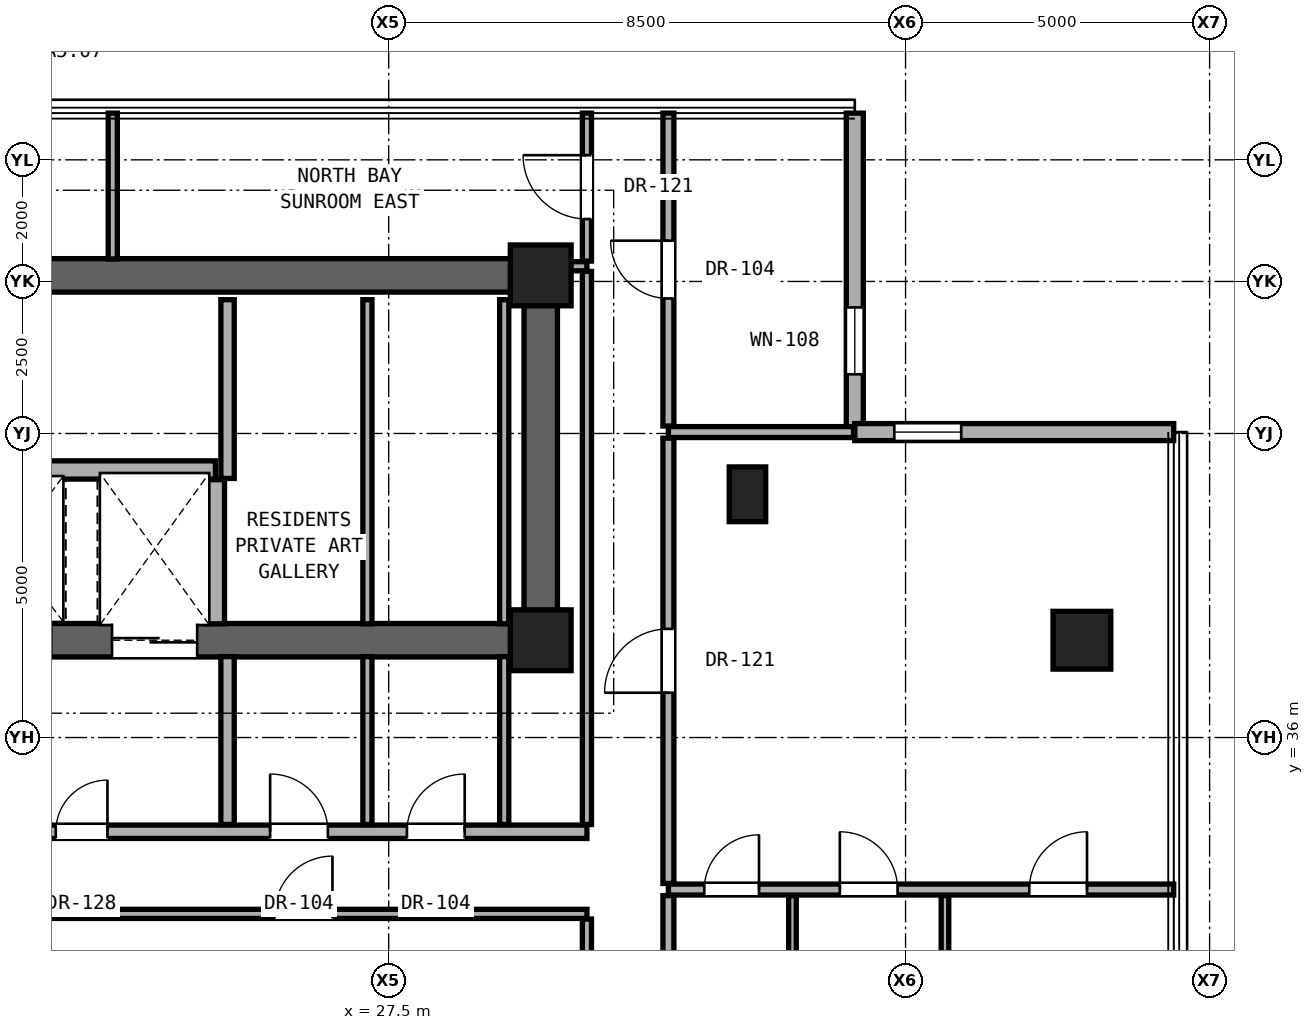
"""IFC4 building model, lengths in metres.
Left out: names, types, materials, properties, quantities, classifications, styles, units other than length and angle.
Written with IfcOpenShell. Run it as: python <this file> out.ifc"""

import sys

from ifc_helpers import new_model, si_unit, direction, frame, frame_2d, origin, origin_2d, place, context, subcontext, project, spatial, rectangle, hollow_rectangle, extrude, element, fill, save


model = new_model("IFC4")
c1 = context("Model", 3, precision=1e-05, world=origin(), true_north=direction((0.0, 1.0)))
c2 = subcontext(c1, "Body", "Model", "MODEL_VIEW")
j1 = project(units=[si_unit("LENGTHUNIT", "METRE"), si_unit("PLANEANGLEUNIT", "RADIAN")], contexts=[c1])
p1 = place(None, origin())
s1 = spatial("IfcSite", under=j1, at=p1, CompositionType="ELEMENT")
p2 = place(p1, origin())
s2 = spatial("IfcBuilding", under=s1, at=p2, CompositionType="ELEMENT")
p3 = place(p2, frame((0.0, 0.0, 157.65)))
s3 = spatial("IfcBuildingStorey", under=s2, at=p3, CompositionType="ELEMENT", Elevation=157.65)
for number, where, z_axis, x_axis in (
    (1, (30.0, 37.6, 0.0), (0.0, 0.0, 1.0), (1.0, 0.0, 0.0)),
    (2, (30.0, 43.6, 0.0), (0.0, 0.0, 1.0), (1.0, 0.0, 0.0)),
):
    element("IfcColumn", number, at=place(p3, frame(where, z_axis=z_axis, x_axis=x_axis)), inside=s3, PredefinedType="COLUMN", context=c2, shape_type="SweptSolid", body=[
        extrude(rectangle(XDim=1.0, YDim=1.0, at=origin_2d()), origin(), (0.0, 0.0, 1.0), 3.25),
    ])
p4 = place(p3, frame((38.9, 37.6, 0.0), z_axis=(0.0, 0.0, 1.0), x_axis=(1.0, 0.0, 0.0)))
e3 = element("IfcColumn", 3, at=p4, inside=s3, PredefinedType="COLUMN", context=c2, shape_type="SweptSolid", body=[
    extrude(hollow_rectangle(XDim=0.95, YDim=0.95, WallThickness=0.05, at=origin_2d()), origin(), (0.0, 0.0, 1.0), 3.25),
])
p5 = place(p3, frame((33.4, 40.0, 0.0), z_axis=(0.0, 0.0, 1.0), x_axis=(1.0, 0.0, 0.0)))
e4 = element("IfcColumn", 4, at=p5, inside=s3, PredefinedType="PILASTER", context=c2, shape_type="SweptSolid", body=[
    extrude(rectangle(XDim=0.6, YDim=0.9, at=origin_2d()), origin(), (0.0, 0.0, 1.0), 3.25),
])
p6 = place(p3, frame((11.0, 43.6, 0.0), z_axis=(0.0, 0.0, 1.0), x_axis=(1.0, 0.0, 0.0)))
e5 = element("IfcWall", 5, at=p6, inside=s3, PredefinedType="SHEAR", context=c2, shape_type="SweptSolid", body=[
    extrude(rectangle(XDim=19.0, YDim=0.55, at=frame_2d((9.5, 0.0))), origin(), (0.0, 0.0, 1.0), 3.05),
])
p7 = place(p3, frame((30.0, 37.6, 0.0), z_axis=(0.0, 0.0, 1.0), x_axis=(0.0, 1.0, 0.0)))
e6 = element("IfcWall", 6, at=p7, inside=s3, PredefinedType="SHEAR", context=c2, shape_type="SweptSolid", body=[
    extrude(rectangle(XDim=6.0, YDim=0.55, at=frame_2d((3.0, 0.0))), origin(), (0.0, 0.0, 1.0), 3.05),
])
p8 = place(p3, frame((11.0, 37.6, 0.0), z_axis=(0.0, 0.0, 1.0), x_axis=(1.0, 0.0, 0.0)))
e7 = element("IfcWall", 7, at=p8, inside=s3, PredefinedType="SHEAR", context=c2, shape_type="SweptSolid", body=[
    extrude(rectangle(XDim=19.0, YDim=0.55, at=frame_2d((9.5, 0.0))), origin(), (0.0, 0.0, 1.0), 3.05),
])
p9 = place(p8, frame((1.06, 0.0, 0.0)))
e8 = element("IfcOpeningElement", 8, at=p9, cuts=e7, PredefinedType="OPENING", context=c2, shape_type="SweptSolid", body=[
    extrude(rectangle(XDim=1.15, YDim=2.2, at=frame_2d((0.575, 1.1))), frame((0.0, 0.285, 0.0), z_axis=(0.0, -1.0, 0.0), x_axis=(1.0, 0.0, 0.0)), (0.0, 0.0, 1.0), 0.57),
])
p10 = place(p8, frame((9.55, 0.0, 0.0)))
e9 = element("IfcOpeningElement", 9, at=p10, cuts=e7, PredefinedType="OPENING", context=c2, shape_type="SweptSolid", body=[
    extrude(rectangle(XDim=1.4, YDim=2.35, at=frame_2d((0.7, 1.175))), frame((0.0, 0.285, 0.0), z_axis=(0.0, -1.0, 0.0), x_axis=(1.0, 0.0, 0.0)), (0.0, 0.0, 1.0), 0.57),
])
p11 = place(p8, frame((11.95, 0.0, 0.0)))
e10 = element("IfcOpeningElement", 10, at=p11, cuts=e7, PredefinedType="OPENING", context=c2, shape_type="SweptSolid", body=[
    extrude(rectangle(XDim=1.4, YDim=2.35, at=frame_2d((0.7, 1.175))), frame((0.0, 0.285, 0.0), z_axis=(0.0, -1.0, 0.0), x_axis=(1.0, 0.0, 0.0)), (0.0, 0.0, 1.0), 0.57),
])
p12 = place(p3, frame((35.165, 41.023, 0.0), z_axis=(0.0, 0.0, 1.0), x_axis=(0.0, 1.0, 0.0)))
e11 = element("IfcWall", 11, at=p12, inside=s3, PredefinedType="SOLIDWALL", context=c2, shape_type="SweptSolid", body=[
    extrude(rectangle(XDim=5.245, YDim=0.28, at=frame_2d((2.623, 0.0))), origin(), (0.0, 0.0, 1.0), 3.03),
])
p13 = place(p12, frame((0.95, 0.0, 0.85)))
e12 = element("IfcOpeningElement", 12, at=p13, cuts=e11, PredefinedType="OPENING", context=c2, shape_type="SweptSolid", body=[
    extrude(rectangle(XDim=1.1, YDim=2.0, at=frame_2d((0.55, 1.0))), frame((0.0, 0.15, 0.0), z_axis=(0.0, -1.0, 0.0), x_axis=(1.0, 0.0, 0.0)), (0.0, 0.0, 1.0), 0.3),
])
p14 = place(p3, frame((40.41, 41.023, 0.0), z_axis=(0.0, 0.0, 1.0), x_axis=(-1.0, 0.0, 0.0)))
e13 = element("IfcWall", 13, at=p14, inside=s3, PredefinedType="SOLIDWALL", context=c2, shape_type="SweptSolid", body=[
    extrude(rectangle(XDim=5.245, YDim=0.28, at=frame_2d((2.623, 0.0))), origin(), (0.0, 0.0, 1.0), 3.03),
])
p15 = place(p14, frame((3.495, 0.0, 0.85)))
e14 = element("IfcOpeningElement", 14, at=p15, cuts=e13, PredefinedType="OPENING", context=c2, shape_type="SweptSolid", body=[
    extrude(rectangle(XDim=1.1, YDim=2.0, at=frame_2d((0.55, 1.0))), frame((0.0, 0.15, 0.0), z_axis=(0.0, -1.0, 0.0), x_axis=(1.0, 0.0, 0.0)), (0.0, 0.0, 1.0), 0.3),
])
p16 = place(p3, frame((21.44, 33.1, 0.0), z_axis=(0.0, 0.0, 1.0), x_axis=(1.0, 0.0, 0.0)))
e15 = element("IfcWall", 15, at=p16, inside=s3, PredefinedType="PARTITIONING", context=c2, shape_type="SweptSolid", body=[
    extrude(rectangle(XDim=9.32, YDim=0.15, at=frame_2d((4.66, 0.0))), origin(), (0.0, 0.0, 1.0), 2.186),
])
p17 = place(p16, frame((4.185, 0.0, 0.0)))
e16 = element("IfcOpeningElement", 16, at=p17, cuts=e15, PredefinedType="OPENING", context=c2, shape_type="SweptSolid", body=[
    extrude(rectangle(XDim=0.95, YDim=2.15, at=frame_2d((0.475, 1.075))), frame((0.0, 0.085, 0.0), z_axis=(0.0, -1.0, 0.0), x_axis=(1.0, 0.0, 0.0)), (0.0, 0.0, 1.0), 0.17),
])
p18 = place(p3, frame((32.1, 33.5, 0.0), z_axis=(0.0, 0.0, 1.0), x_axis=(1.0, 0.0, 0.0)))
e17 = element("IfcWall", 17, at=p18, inside=s3, PredefinedType="PARTITIONING", context=c2, shape_type="SweptSolid", body=[
    extrude(rectangle(XDim=8.31, YDim=0.18, at=frame_2d((4.155, 0.0))), origin(), (0.0, 0.0, 1.0), 2.269),
])
p19 = place(p18, frame((5.934, 0.0, 0.0)))
e18 = element("IfcOpeningElement", 18, at=p19, cuts=e17, PredefinedType="OPENING", context=c2, shape_type="SweptSolid", body=[
    extrude(rectangle(XDim=0.95, YDim=2.15, at=frame_2d((0.475, 1.075))), frame((0.0, 0.1, 0.0), z_axis=(0.0, -1.0, 0.0), x_axis=(1.0, 0.0, 0.0)), (0.0, 0.0, 1.0), 0.2),
])
p20 = place(p18, frame((2.819, 0.0, 0.0)))
e19 = element("IfcOpeningElement", 19, at=p20, cuts=e17, PredefinedType="OPENING", context=c2, shape_type="SweptSolid", body=[
    extrude(rectangle(XDim=0.95, YDim=2.15, at=frame_2d((0.475, 1.075))), frame((0.0, 0.1, 0.0), z_axis=(0.0, -1.0, 0.0), x_axis=(1.0, 0.0, 0.0)), (0.0, 0.0, 1.0), 0.2),
])
p21 = place(p18, frame((0.59, 0.0, 0.0)))
e20 = element("IfcOpeningElement", 20, at=p21, cuts=e17, PredefinedType="OPENING", context=c2, shape_type="SweptSolid", body=[
    extrude(rectangle(XDim=0.9, YDim=2.1, at=frame_2d((0.45, 1.05))), frame((0.0, 0.1, 0.0), z_axis=(0.0, -1.0, 0.0), x_axis=(1.0, 0.0, 0.0)), (0.0, 0.0, 1.0), 0.2),
])
p22 = place(p3, frame((15.59, 34.45, 0.0), z_axis=(0.0, 0.0, 1.0), x_axis=(1.0, 0.0, 0.0)))
e21 = element("IfcWall", 21, at=p22, inside=s3, PredefinedType="SOLIDWALL", context=c2, shape_type="SweptSolid", body=[
    extrude(rectangle(XDim=15.17, YDim=0.22, at=frame_2d((7.585, 0.0))), origin(), (0.0, 0.0, 1.0), 2.186),
])
p23 = place(p22, frame((6.435, 0.0, 0.0)))
e22 = element("IfcOpeningElement", 22, at=p23, cuts=e21, PredefinedType="OPENING", context=c2, shape_type="SweptSolid", body=[
    extrude(rectangle(XDim=0.85, YDim=2.01, at=frame_2d((0.425, 1.005))), frame((0.0, 0.12, 0.0), z_axis=(0.0, -1.0, 0.0), x_axis=(1.0, 0.0, 0.0)), (0.0, 0.0, 1.0), 0.24),
])
p24 = place(p22, frame((9.96, 0.0, 0.0)))
e23 = element("IfcOpeningElement", 23, at=p24, cuts=e21, PredefinedType="OPENING", context=c2, shape_type="SweptSolid", body=[
    extrude(rectangle(XDim=0.95, YDim=2.15, at=frame_2d((0.475, 1.075))), frame((0.0, 0.12, 0.0), z_axis=(0.0, -1.0, 0.0), x_axis=(1.0, 0.0, 0.0)), (0.0, 0.0, 1.0), 0.24),
])
p25 = place(p22, frame((12.21, 0.0, 0.0)))
e24 = element("IfcOpeningElement", 24, at=p25, cuts=e21, PredefinedType="OPENING", context=c2, shape_type="SweptSolid", body=[
    extrude(rectangle(XDim=0.95, YDim=2.15, at=frame_2d((0.475, 1.075))), frame((0.0, 0.12, 0.0), z_axis=(0.0, -1.0, 0.0), x_axis=(1.0, 0.0, 0.0)), (0.0, 0.0, 1.0), 0.24),
])
p26 = place(p22, frame((0.675, 0.0, 0.0)))
e25 = element("IfcOpeningElement", 25, at=p26, cuts=e21, PredefinedType="OPENING", context=c2, shape_type="SweptSolid", body=[
    extrude(rectangle(XDim=0.85, YDim=2.01, at=frame_2d((0.425, 1.005))), frame((0.0, 0.12, 0.0), z_axis=(0.0, -1.0, 0.0), x_axis=(1.0, 0.0, 0.0)), (0.0, 0.0, 1.0), 0.24),
])
p27 = place(p22, frame((2.835, 0.0, 0.0)))
e26 = element("IfcOpeningElement", 26, at=p27, cuts=e21, PredefinedType="OPENING", context=c2, shape_type="SweptSolid", body=[
    extrude(rectangle(XDim=0.85, YDim=2.01, at=frame_2d((0.425, 1.005))), frame((0.0, 0.12, 0.0), z_axis=(0.0, -1.0, 0.0), x_axis=(1.0, 0.0, 0.0)), (0.0, 0.0, 1.0), 0.24),
])
p28 = place(p3, frame((20.25, 40.4, 0.0), z_axis=(0.0, 0.0, 1.0), x_axis=(1.0, 0.0, 0.0)))
e27 = element("IfcWall", 27, at=p28, inside=s3, PredefinedType="SOLIDWALL", context=c2, shape_type="SweptSolid", body=[
    extrude(rectangle(XDim=4.4, YDim=0.3, at=frame_2d((2.2, 0.0))), origin(), (0.0, 0.0, 1.0), 3.05),
])
p29 = place(p3, frame((32.1, 41.023, 0.0), z_axis=(0.0, 0.0, 1.0), x_axis=(1.0, 0.0, 0.0)))
e28 = element("IfcWall", 28, at=p29, inside=s3, PredefinedType="PARTITIONING", context=c2, shape_type="SweptSolid", body=[
    extrude(rectangle(XDim=3.045, YDim=0.18, at=frame_2d((1.522, 0.0))), origin(), (0.0, 0.0, 1.0), 3.05),
])
p30 = place(p3, frame((30.27, 43.75, 0.0), z_axis=(0.0, 0.0, 1.0), x_axis=(1.0, 0.0, 0.0)))
e29 = element("IfcWall", 29, at=p30, inside=s3, PredefinedType="PARTITIONING", context=c2, shape_type="SweptSolid", body=[
    extrude(rectangle(XDim=0.49, YDim=0.15, at=frame_2d((0.245, 0.0))), origin(), (0.0, 0.0, 1.0), 3.05),
])
p31 = place(p3, frame((22.962, 43.87, 0.0), z_axis=(0.0, 0.0, 1.0), x_axis=(0.0, 1.0, 0.0)))
e30 = element("IfcWall", 30, at=p31, inside=s3, PredefinedType="PARTITIONING", context=c2, shape_type="SweptSolid", body=[
    extrude(rectangle(XDim=2.398, YDim=0.15, at=frame_2d((1.199, 0.0))), origin(), (0.0, 0.0, 1.0), 3.05),
])
p32 = place(p3, frame((24.65, 37.87, 0.0), z_axis=(0.0, 0.0, 1.0), x_axis=(0.0, 1.0, 0.0)))
e31 = element("IfcWall", 31, at=p32, inside=s3, PredefinedType="SOLIDWALL", context=c2, shape_type="SweptSolid", body=[
    extrude(rectangle(XDim=2.37, YDim=0.3, at=frame_2d((1.185, 0.0))), origin(), (0.0, 0.0, 1.0), 3.05),
])
p33 = place(p3, frame((24.85, 34.57, 0.0), z_axis=(0.0, 0.0, 1.0), x_axis=(0.0, 1.0, 0.0)))
e32 = element("IfcWall", 32, at=p33, inside=s3, PredefinedType="SOLIDWALL", context=c2, shape_type="SweptSolid", body=[
    extrude(rectangle(XDim=2.76, YDim=0.22, at=frame_2d((1.38, 0.0))), origin(), (0.0, 0.0, 1.0), 3.05),
])
p34 = place(p3, frame((24.85, 40.26, 0.0), z_axis=(0.0, 0.0, 1.0), x_axis=(0.0, 1.0, 0.0)))
e33 = element("IfcWall", 33, at=p34, inside=s3, PredefinedType="SOLIDWALL", context=c2, shape_type="SweptSolid", body=[
    extrude(rectangle(XDim=2.94, YDim=0.22, at=frame_2d((1.47, 0.0))), origin(), (0.0, 0.0, 1.0), 3.05),
])
p35 = place(p3, frame((27.15, 34.57, 0.0), z_axis=(0.0, 0.0, 1.0), x_axis=(0.0, 1.0, 0.0)))
e34 = element("IfcWall", 34, at=p35, inside=s3, PredefinedType="PARTITIONING", context=c2, shape_type="SweptSolid", body=[
    extrude(rectangle(XDim=2.76, YDim=0.15, at=frame_2d((1.38, 0.0))), origin(), (0.0, 0.0, 1.0), 3.05),
])
p36 = place(p3, frame((27.15, 37.87, 0.0), z_axis=(0.0, 0.0, 1.0), x_axis=(0.0, 1.0, 0.0)))
e35 = element("IfcWall", 35, at=p36, inside=s3, PredefinedType="PARTITIONING", context=c2, shape_type="SweptSolid", body=[
    extrude(rectangle(XDim=5.33, YDim=0.15, at=frame_2d((2.665, 0.0))), origin(), (0.0, 0.0, 1.0), 3.05),
])
p37 = place(p3, frame((29.4, 34.57, 0.0), z_axis=(0.0, 0.0, 1.0), x_axis=(0.0, 1.0, 0.0)))
e36 = element("IfcWall", 36, at=p37, inside=s3, PredefinedType="PARTITIONING", context=c2, shape_type="SweptSolid", body=[
    extrude(rectangle(XDim=2.76, YDim=0.15, at=frame_2d((1.38, 0.0))), origin(), (0.0, 0.0, 1.0), 3.05),
])
p38 = place(p3, frame((29.4, 37.87, 0.0), z_axis=(0.0, 0.0, 1.0), x_axis=(0.0, 1.0, 0.0)))
e37 = element("IfcWall", 37, at=p38, inside=s3, PredefinedType="PARTITIONING", context=c2, shape_type="SweptSolid", body=[
    extrude(rectangle(XDim=5.33, YDim=0.15, at=frame_2d((2.665, 0.0))), origin(), (0.0, 0.0, 1.0), 3.05),
])
p39 = place(p3, frame((30.76, 27.485, 0.0), z_axis=(0.0, 0.0, 1.0), x_axis=(0.0, 1.0, 0.0)))
e38 = element("IfcWall", 38, at=p39, inside=s3, PredefinedType="PARTITIONING", context=c2, shape_type="SweptSolid", body=[
    extrude(rectangle(XDim=5.53, YDim=0.15, at=frame_2d((2.765, 0.0))), origin(), (0.0, 0.0, 1.0), 2.346),
])
p40 = place(p3, frame((30.76, 34.57, 0.0), z_axis=(0.0, 0.0, 1.0), x_axis=(0.0, 1.0, 0.0)))
e39 = element("IfcWall", 39, at=p40, inside=s3, PredefinedType="PARTITIONING", context=c2, shape_type="SweptSolid", body=[
    extrude(rectangle(XDim=9.095, YDim=0.15, at=frame_2d((4.547, 0.0))), origin(), (0.0, 0.0, 1.0), 2.442),
])
p41 = place(p3, frame((30.76, 43.835, 0.0), z_axis=(0.0, 0.0, 1.0), x_axis=(0.0, 1.0, 0.0)))
e40 = element("IfcWall", 40, at=p41, inside=s3, PredefinedType="PARTITIONING", context=c2, shape_type="SweptSolid", body=[
    extrude(rectangle(XDim=2.433, YDim=0.15, at=frame_2d((1.217, 0.0))), origin(), (0.0, 0.0, 1.0), 3.05),
])
p42 = place(p41, frame((0.691, 0.0, 0.0)))
e41 = element("IfcOpeningElement", 41, at=p42, cuts=e40, PredefinedType="OPENING", context=c2, shape_type="SweptSolid", body=[
    extrude(rectangle(XDim=1.05, YDim=2.2, at=frame_2d((0.525, 1.1))), frame((0.0, 0.085, 0.0), z_axis=(0.0, -1.0, 0.0), x_axis=(1.0, 0.0, 0.0)), (0.0, 0.0, 1.0), 0.17),
])
p43 = place(p3, frame((32.1, 31.272, 0.0), z_axis=(0.0, 0.0, 1.0), x_axis=(0.0, 1.0, 0.0)))
e42 = element("IfcWall", 42, at=p43, inside=s3, PredefinedType="PARTITIONING", context=c2, shape_type="SweptSolid", body=[
    extrude(rectangle(XDim=2.127, YDim=0.18, at=frame_2d((1.064, 0.0))), origin(), (0.0, 0.0, 1.0), 2.346),
])
p44 = place(p3, frame((32.1, 33.6, 0.0), z_axis=(0.0, 0.0, 1.0), x_axis=(0.0, 1.0, 0.0)))
e43 = element("IfcWall", 43, at=p44, inside=s3, PredefinedType="PARTITIONING", context=c2, shape_type="SweptSolid", body=[
    extrude(rectangle(XDim=7.323, YDim=0.18, at=frame_2d((3.662, 0.0))), origin(), (0.0, 0.0, 1.0), 2.442),
])
p45 = place(p44, frame((3.136, 0.0, 0.0)))
e44 = element("IfcOpeningElement", 44, at=p45, cuts=e43, PredefinedType="OPENING", context=c2, shape_type="SweptSolid", body=[
    extrude(rectangle(XDim=1.05, YDim=2.2, at=frame_2d((0.525, 1.1))), frame((0.0, 0.1, 0.0), z_axis=(0.0, -1.0, 0.0), x_axis=(1.0, 0.0, 0.0)), (0.0, 0.0, 1.0), 0.2),
])
p46 = place(p3, frame((32.1, 41.123, 0.0), z_axis=(0.0, 0.0, 1.0), x_axis=(0.0, 1.0, 0.0)))
e45 = element("IfcWall", 45, at=p46, inside=s3, PredefinedType="PARTITIONING", context=c2, shape_type="SweptSolid", body=[
    extrude(rectangle(XDim=5.145, YDim=0.18, at=frame_2d((2.573, 0.0))), origin(), (0.0, 0.0, 1.0), 3.05),
])
p47 = place(p46, frame((2.097, 0.0, 0.0)))
e46 = element("IfcOpeningElement", 46, at=p47, cuts=e45, PredefinedType="OPENING", context=c2, shape_type="SweptSolid", body=[
    extrude(rectangle(XDim=0.95, YDim=2.15, at=frame_2d((0.475, 1.075))), frame((0.0, 0.1, 0.0), z_axis=(0.0, -1.0, 0.0), x_axis=(1.0, 0.0, 0.0)), (0.0, 0.0, 1.0), 0.2),
])
for number, where, z_axis, x_axis in (
    (47, (34.14, 31.272, 0.0), (0.0, 0.0, 1.0), (0.0, 1.0, 0.0)),
    (48, (36.648, 31.272, 0.0), (0.0, 0.0, 1.0), (0.0, 1.0, 0.0)),
):
    element("IfcWall", number, at=place(p3, frame(where, z_axis=z_axis, x_axis=x_axis)), inside=s3, PredefinedType="PARTITIONING", context=c2, shape_type="SweptSolid", body=[
        extrude(rectangle(XDim=2.127, YDim=0.125, at=frame_2d((1.064, 0.0))), origin(), (0.0, 0.0, 1.0), 2.346),
    ])
p48 = place(p13, origin())
e49 = element("IfcWindow", 49, at=p48, inside=s3, PartitioningType="SINGLE_PANEL", PredefinedType="WINDOW", context=c2, shape_type="SweptSolid", body=[
    extrude(rectangle(XDim=1.1, YDim=2.0, at=frame_2d((0.55, 1.0))), frame((0.0, 0.03, 0.0), z_axis=(0.0, -1.0, 0.0), x_axis=(1.0, 0.0, 0.0)), (0.0, 0.0, 1.0), 0.06),
])
fill(e12, e49)
p49 = place(p15, origin())
e50 = element("IfcWindow", 50, at=p49, inside=s3, PartitioningType="SINGLE_PANEL", PredefinedType="WINDOW", context=c2, shape_type="SweptSolid", body=[
    extrude(rectangle(XDim=1.1, YDim=2.0, at=frame_2d((0.55, 1.0))), frame((0.0, 0.03, 0.0), z_axis=(0.0, -1.0, 0.0), x_axis=(1.0, 0.0, 0.0)), (0.0, 0.0, 1.0), 0.06),
])
fill(e14, e50)
p50 = place(p23, origin())
e51 = element("IfcDoor", 51, at=p50, inside=s3, OperationType="SINGLE_SWING_RIGHT", PredefinedType="DOOR", context=c2, shape_type="SweptSolid", body=[
    extrude(rectangle(XDim=0.85, YDim=2.01, at=frame_2d((0.425, 1.005))), frame((0.0, 0.025, 0.0), z_axis=(0.0, -1.0, 0.0), x_axis=(1.0, 0.0, 0.0)), (0.0, 0.0, 1.0), 0.05),
])
fill(e22, e51)
p51 = place(p24, origin())
e52 = element("IfcDoor", 52, at=p51, inside=s3, OperationType="SINGLE_SWING_LEFT", PredefinedType="DOOR", context=c2, shape_type="SweptSolid", body=[
    extrude(rectangle(XDim=0.95, YDim=2.15, at=frame_2d((0.475, 1.075))), frame((0.0, 0.025, 0.0), z_axis=(0.0, -1.0, 0.0), x_axis=(1.0, 0.0, 0.0)), (0.0, 0.0, 1.0), 0.05),
])
fill(e23, e52)
p52 = place(p25, origin())
e53 = element("IfcDoor", 53, at=p52, inside=s3, OperationType="SINGLE_SWING_RIGHT", PredefinedType="DOOR", context=c2, shape_type="SweptSolid", body=[
    extrude(rectangle(XDim=0.95, YDim=2.15, at=frame_2d((0.475, 1.075))), frame((0.0, 0.025, 0.0), z_axis=(0.0, -1.0, 0.0), x_axis=(1.0, 0.0, 0.0)), (0.0, 0.0, 1.0), 0.05),
])
fill(e24, e53)
p53 = place(p45, origin())
e54 = element("IfcDoor", 54, at=p53, inside=s3, OperationType="SINGLE_SWING_LEFT", PredefinedType="DOOR", context=c2, shape_type="SweptSolid", body=[
    extrude(rectangle(XDim=1.05, YDim=2.2, at=frame_2d((0.525, 1.1))), frame((0.0, 0.025, 0.0), z_axis=(0.0, -1.0, 0.0), x_axis=(1.0, 0.0, 0.0)), (0.0, 0.0, 1.0), 0.05),
])
fill(e44, e54)
p54 = place(p19, origin())
e55 = element("IfcDoor", 55, at=p54, inside=s3, OperationType="SINGLE_SWING_RIGHT", PredefinedType="DOOR", context=c2, shape_type="SweptSolid", body=[
    extrude(rectangle(XDim=0.95, YDim=2.15, at=frame_2d((0.475, 1.075))), frame((0.0, 0.025, 0.0), z_axis=(0.0, -1.0, 0.0), x_axis=(1.0, 0.0, 0.0)), (0.0, 0.0, 1.0), 0.05),
])
fill(e18, e55)
p55 = place(p20, origin())
e56 = element("IfcDoor", 56, at=p55, inside=s3, OperationType="SINGLE_SWING_LEFT", PredefinedType="DOOR", context=c2, shape_type="SweptSolid", body=[
    extrude(rectangle(XDim=0.95, YDim=2.15, at=frame_2d((0.475, 1.075))), frame((0.0, 0.025, 0.0), z_axis=(0.0, -1.0, 0.0), x_axis=(1.0, 0.0, 0.0)), (0.0, 0.0, 1.0), 0.05),
])
fill(e19, e56)
p56 = place(p21, origin())
e57 = element("IfcDoor", 57, at=p56, inside=s3, OperationType="SINGLE_SWING_RIGHT", PredefinedType="DOOR", context=c2, shape_type="SweptSolid", body=[
    extrude(rectangle(XDim=0.9, YDim=2.1, at=frame_2d((0.45, 1.05))), frame((0.0, 0.025, 0.0), z_axis=(0.0, -1.0, 0.0), x_axis=(1.0, 0.0, 0.0)), (0.0, 0.0, 1.0), 0.05),
])
fill(e20, e57)
p57 = place(p17, origin())
e58 = element("IfcDoor", 58, at=p57, inside=s3, OperationType="SINGLE_SWING_RIGHT", PredefinedType="DOOR", context=c2, shape_type="SweptSolid", body=[
    extrude(rectangle(XDim=0.95, YDim=2.15, at=frame_2d((0.475, 1.075))), frame((0.0, 0.025, 0.0), z_axis=(0.0, -1.0, 0.0), x_axis=(1.0, 0.0, 0.0)), (0.0, 0.0, 1.0), 0.05),
])
fill(e16, e58)
p58 = place(p42, origin())
e59 = element("IfcDoor", 59, at=p58, inside=s3, OperationType="SINGLE_SWING_RIGHT", PredefinedType="DOOR", context=c2, shape_type="SweptSolid", body=[
    extrude(rectangle(XDim=1.05, YDim=2.2, at=frame_2d((0.525, 1.1))), frame((0.0, 0.025, 0.0), z_axis=(0.0, -1.0, 0.0), x_axis=(1.0, 0.0, 0.0)), (0.0, 0.0, 1.0), 0.05),
])
fill(e41, e59)
p59 = place(p47, origin())
e60 = element("IfcDoor", 60, at=p59, inside=s3, OperationType="SINGLE_SWING_RIGHT", PredefinedType="DOOR", context=c2, shape_type="SweptSolid", body=[
    extrude(rectangle(XDim=0.95, YDim=2.15, at=frame_2d((0.475, 1.075))), frame((0.0, 0.025, 0.0), z_axis=(0.0, -1.0, 0.0), x_axis=(1.0, 0.0, 0.0)), (0.0, 0.0, 1.0), 0.05),
])
fill(e46, e60)
p60 = place(p11, origin())
e61 = element("IfcDoor", 61, at=p60, inside=s3, OperationType="DOUBLE_DOOR_SLIDING", PredefinedType="DOOR", context=c2, shape_type="SweptSolid", body=[
    extrude(rectangle(XDim=1.4, YDim=2.35, at=frame_2d((0.7, 1.175))), frame((0.0, 0.025, 0.0), z_axis=(0.0, -1.0, 0.0), x_axis=(1.0, 0.0, 0.0)), (0.0, 0.0, 1.0), 0.05),
])
fill(e10, e61)
save(model, sys.argv[1])
